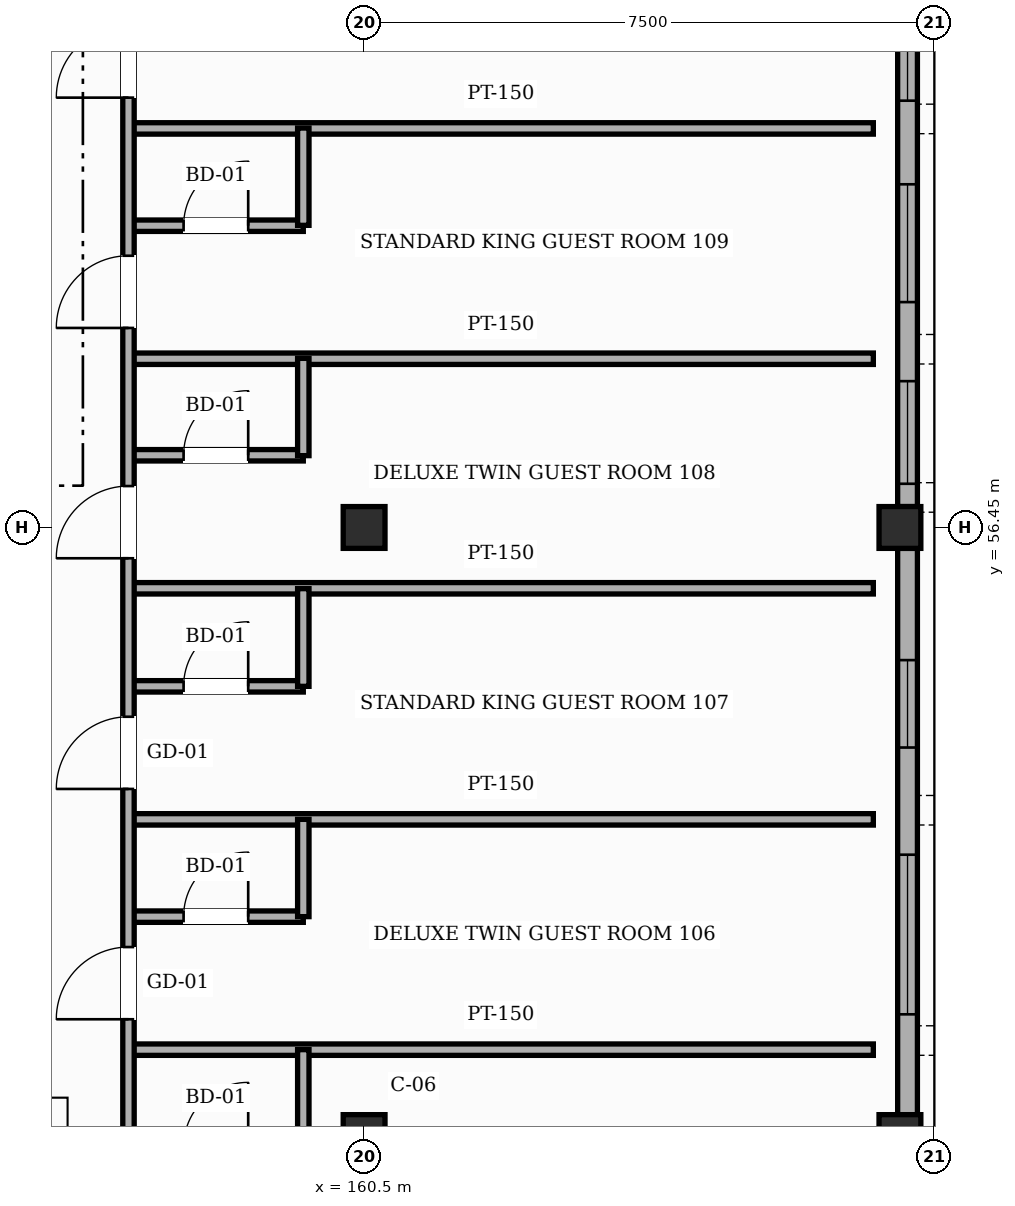
"""IFC4 building model, lengths in metres.
Left out: names, types, materials, properties, quantities, classifications, styles, units other than length and angle.
Written with IfcOpenShell. Run it as: python <this file> out.ifc"""

import sys

from ifc_helpers import new_model, si_unit, direction, frame, frame_2d, origin, origin_2d, place, context, subcontext, project, spatial, rectangle, hollow_rectangle, extrude, element, fill, save


model = new_model("IFC4")
c1 = context("Model", 3, precision=1e-05, world=origin(), true_north=direction((0.0, 1.0)))
c2 = subcontext(c1, "Body", "Model", "MODEL_VIEW")
j1 = project(units=[si_unit("LENGTHUNIT", "METRE"), si_unit("PLANEANGLEUNIT", "RADIAN")], contexts=[c1])
p1 = place(None, origin())
s1 = spatial("IfcSite", under=j1, at=p1, CompositionType="ELEMENT")
p2 = place(p1, origin())
s2 = spatial("IfcBuilding", under=s1, at=p2, CompositionType="ELEMENT")
p3 = place(p2, frame((0.0, 0.0, 24.6)))
s3 = spatial("IfcBuildingStorey", under=s2, at=p3, CompositionType="ELEMENT", Elevation=24.6)
for number, where, z_axis, x_axis in (
    (1, (160.5, 48.45, 0.0), (0.0, 0.0, 1.0), (1.0, 0.0, 0.0)),
    (2, (160.5, 56.45, 0.0), (0.0, 0.0, 1.0), (1.0, 0.0, 0.0)),
    (3, (167.55, 48.45, 0.0), (0.0, 0.0, 1.0), (1.0, 0.0, 0.0)),
    (4, (167.55, 56.45, 0.0), (0.0, 0.0, 1.0), (1.0, 0.0, 0.0)),
):
    element("IfcColumn", number, at=place(p3, frame(where, z_axis=z_axis, x_axis=x_axis)), inside=s3, PredefinedType="COLUMN", context=c2, shape_type="SweptSolid", body=[
        extrude(hollow_rectangle(XDim=0.55, YDim=0.55, WallThickness=0.022, InnerFilletRadius=0.022, OuterFilletRadius=0.044, at=origin_2d()), origin(), (0.0, 0.0, 1.0), 3.6),
    ])
p4 = place(p3, frame((167.65, 56.175, 0.0), z_axis=(0.0, 0.0, 1.0), x_axis=(0.0, -1.0, 0.0)))
e5 = element("IfcWall", 5, at=p4, inside=s3, PredefinedType="SOLIDWALL", context=c2, shape_type="SweptSolid", body=[
    extrude(rectangle(XDim=7.45, YDim=0.26, at=frame_2d((3.725, 0.0))), origin(), (0.0, 0.0, 1.0), 2.755),
])
p5 = place(p4, frame((4.03, 0.0, 0.85)))
e6 = element("IfcOpeningElement", 6, at=p5, cuts=e5, PredefinedType="OPENING", context=c2, shape_type="SweptSolid", body=[
    extrude(rectangle(XDim=2.1, YDim=1.35, at=frame_2d((1.05, 0.675))), frame((0.0, 0.14, 0.0), z_axis=(0.0, -1.0, 0.0), x_axis=(1.0, 0.0, 0.0)), (0.0, 0.0, 1.0), 0.28),
])
p6 = place(p4, frame((1.47, 0.0, 0.85)))
e7 = element("IfcOpeningElement", 7, at=p6, cuts=e5, PredefinedType="OPENING", context=c2, shape_type="SweptSolid", body=[
    extrude(rectangle(XDim=1.15, YDim=1.5, at=frame_2d((0.575, 0.75))), frame((0.0, 0.14, 0.0), z_axis=(0.0, -1.0, 0.0), x_axis=(1.0, 0.0, 0.0)), (0.0, 0.0, 1.0), 0.28),
])
p7 = place(p3, frame((167.65, 64.175, 0.0), z_axis=(0.0, 0.0, 1.0), x_axis=(0.0, -1.0, 0.0)))
e8 = element("IfcWall", 8, at=p7, inside=s3, PredefinedType="SOLIDWALL", context=c2, shape_type="SweptSolid", body=[
    extrude(rectangle(XDim=7.45, YDim=0.26, at=frame_2d((3.725, 0.0))), origin(), (0.0, 0.0, 1.0), 2.755),
])
p8 = place(p7, frame((5.8, 0.0, 0.85)))
e9 = element("IfcOpeningElement", 9, at=p8, cuts=e8, PredefinedType="OPENING", context=c2, shape_type="SweptSolid", body=[
    extrude(rectangle(XDim=1.35, YDim=1.5, at=frame_2d((0.675, 0.75))), frame((0.0, 0.14, 0.0), z_axis=(0.0, -1.0, 0.0), x_axis=(1.0, 0.0, 0.0)), (0.0, 0.0, 1.0), 0.28),
])
p9 = place(p7, frame((3.21, 0.0, 0.85)))
e10 = element("IfcOpeningElement", 10, at=p9, cuts=e8, PredefinedType="OPENING", context=c2, shape_type="SweptSolid", body=[
    extrude(rectangle(XDim=1.55, YDim=1.5, at=frame_2d((0.775, 0.75))), frame((0.0, 0.14, 0.0), z_axis=(0.0, -1.0, 0.0), x_axis=(1.0, 0.0, 0.0)), (0.0, 0.0, 1.0), 0.28),
])
p10 = place(p7, frame((0.36, 0.0, 0.85)))
e11 = element("IfcOpeningElement", 11, at=p10, cuts=e8, PredefinedType="OPENING", context=c2, shape_type="SweptSolid", body=[
    extrude(rectangle(XDim=1.75, YDim=1.5, at=frame_2d((0.875, 0.75))), frame((0.0, 0.14, 0.0), z_axis=(0.0, -1.0, 0.0), x_axis=(1.0, 0.0, 0.0)), (0.0, 0.0, 1.0), 0.28),
])
p11 = place(p3, frame((157.4, 49.58, 0.0), z_axis=(0.0, 0.0, 1.0), x_axis=(1.0, 0.0, 0.0)))
e12 = element("IfcWall", 12, at=p11, inside=s3, PredefinedType="PARTITIONING", context=c2, shape_type="SweptSolid", body=[
    extrude(rectangle(XDim=9.8, YDim=0.15, at=frame_2d((4.9, 0.0))), origin(), (0.0, 0.0, 1.0), 3.365),
])
p12 = place(p3, frame((157.4, 51.33, 0.0), z_axis=(0.0, 0.0, 1.0), x_axis=(1.0, 0.0, 0.0)))
e13 = element("IfcWall", 13, at=p12, inside=s3, PredefinedType="PARTITIONING", context=c2, shape_type="SweptSolid", body=[
    extrude(rectangle(XDim=2.3, YDim=0.15, at=frame_2d((1.15, 0.0))), origin(), (0.0, 0.0, 1.0), 3.365),
])
p13 = place(p12, frame((0.725, 0.0, 0.0)))
e14 = element("IfcOpeningElement", 14, at=p13, cuts=e13, PredefinedType="OPENING", context=c2, shape_type="SweptSolid", body=[
    extrude(rectangle(XDim=0.85, YDim=2.1, at=frame_2d((0.425, 1.05))), frame((0.0, 0.085, 0.0), z_axis=(0.0, -1.0, 0.0), x_axis=(1.0, 0.0, 0.0)), (0.0, 0.0, 1.0), 0.17),
])
p14 = place(p3, frame((157.4, 52.61, 0.0), z_axis=(0.0, 0.0, 1.0), x_axis=(1.0, 0.0, 0.0)))
e15 = element("IfcWall", 15, at=p14, inside=s3, PredefinedType="PARTITIONING", context=c2, shape_type="SweptSolid", body=[
    extrude(rectangle(XDim=9.8, YDim=0.15, at=frame_2d((4.9, 0.0))), origin(), (0.0, 0.0, 1.0), 3.055),
])
p15 = place(p3, frame((157.4, 54.36, 0.0), z_axis=(0.0, 0.0, 1.0), x_axis=(1.0, 0.0, 0.0)))
e16 = element("IfcWall", 16, at=p15, inside=s3, PredefinedType="PARTITIONING", context=c2, shape_type="SweptSolid", body=[
    extrude(rectangle(XDim=2.3, YDim=0.15, at=frame_2d((1.15, 0.0))), origin(), (0.0, 0.0, 1.0), 3.365),
])
p16 = place(p15, frame((0.725, 0.0, 0.0)))
e17 = element("IfcOpeningElement", 17, at=p16, cuts=e16, PredefinedType="OPENING", context=c2, shape_type="SweptSolid", body=[
    extrude(rectangle(XDim=0.85, YDim=2.1, at=frame_2d((0.425, 1.05))), frame((0.0, 0.085, 0.0), z_axis=(0.0, -1.0, 0.0), x_axis=(1.0, 0.0, 0.0)), (0.0, 0.0, 1.0), 0.17),
])
p17 = place(p3, frame((157.4, 55.65, 0.0), z_axis=(0.0, 0.0, 1.0), x_axis=(1.0, 0.0, 0.0)))
e18 = element("IfcWall", 18, at=p17, inside=s3, PredefinedType="PARTITIONING", context=c2, shape_type="SweptSolid", body=[
    extrude(rectangle(XDim=9.8, YDim=0.15, at=frame_2d((4.9, 0.0))), origin(), (0.0, 0.0, 1.0), 3.365),
])
p18 = place(p3, frame((157.4, 57.4, 0.0), z_axis=(0.0, 0.0, 1.0), x_axis=(1.0, 0.0, 0.0)))
e19 = element("IfcWall", 19, at=p18, inside=s3, PredefinedType="PARTITIONING", context=c2, shape_type="SweptSolid", body=[
    extrude(rectangle(XDim=2.3, YDim=0.15, at=frame_2d((1.15, 0.0))), origin(), (0.0, 0.0, 1.0), 3.365),
])
p19 = place(p18, frame((0.725, 0.0, 0.0)))
e20 = element("IfcOpeningElement", 20, at=p19, cuts=e19, PredefinedType="OPENING", context=c2, shape_type="SweptSolid", body=[
    extrude(rectangle(XDim=0.85, YDim=2.1, at=frame_2d((0.425, 1.05))), frame((0.0, 0.085, 0.0), z_axis=(0.0, -1.0, 0.0), x_axis=(1.0, 0.0, 0.0)), (0.0, 0.0, 1.0), 0.17),
])
p20 = place(p3, frame((157.4, 58.67, 0.0), z_axis=(0.0, 0.0, 1.0), x_axis=(1.0, 0.0, 0.0)))
e21 = element("IfcWall", 21, at=p20, inside=s3, PredefinedType="PARTITIONING", context=c2, shape_type="SweptSolid", body=[
    extrude(rectangle(XDim=9.8, YDim=0.15, at=frame_2d((4.9, 0.0))), origin(), (0.0, 0.0, 1.0), 3.365),
])
p21 = place(p3, frame((157.4, 60.42, 0.0), z_axis=(0.0, 0.0, 1.0), x_axis=(1.0, 0.0, 0.0)))
e22 = element("IfcWall", 22, at=p21, inside=s3, PredefinedType="PARTITIONING", context=c2, shape_type="SweptSolid", body=[
    extrude(rectangle(XDim=2.3, YDim=0.15, at=frame_2d((1.15, 0.0))), origin(), (0.0, 0.0, 1.0), 3.365),
])
p22 = place(p21, frame((0.725, 0.0, 0.0)))
e23 = element("IfcOpeningElement", 23, at=p22, cuts=e22, PredefinedType="OPENING", context=c2, shape_type="SweptSolid", body=[
    extrude(rectangle(XDim=0.85, YDim=2.1, at=frame_2d((0.425, 1.05))), frame((0.0, 0.085, 0.0), z_axis=(0.0, -1.0, 0.0), x_axis=(1.0, 0.0, 0.0)), (0.0, 0.0, 1.0), 0.17),
])
p23 = place(p3, frame((157.4, 61.7, 0.0), z_axis=(0.0, 0.0, 1.0), x_axis=(1.0, 0.0, 0.0)))
e24 = element("IfcWall", 24, at=p23, inside=s3, PredefinedType="PARTITIONING", context=c2, shape_type="SweptSolid", body=[
    extrude(rectangle(XDim=9.8, YDim=0.15, at=frame_2d((4.9, 0.0))), origin(), (0.0, 0.0, 1.0), 3.365),
])
p24 = place(p3, frame((157.4, 22.3, 0.0), z_axis=(0.0, 0.0, 1.0), x_axis=(0.0, 1.0, 0.0)))
e25 = element("IfcWall", 25, at=p24, inside=s3, PredefinedType="PARTITIONING", context=c2, shape_type="SweptSolid", body=[
    extrude(rectangle(XDim=48.5, YDim=0.15, at=frame_2d((24.25, 0.0))), origin(), (0.0, 0.0, 1.0), 3.365),
])
p25 = place(p24, frame((0.4, 0.0, 0.0)))
e26 = element("IfcOpeningElement", 26, at=p25, cuts=e25, PredefinedType="OPENING", context=c2, shape_type="SweptSolid", body=[
    extrude(rectangle(XDim=0.95, YDim=2.15, at=frame_2d((0.475, 1.075))), frame((0.0, 0.085, 0.0), z_axis=(0.0, -1.0, 0.0), x_axis=(1.0, 0.0, 0.0)), (0.0, 0.0, 1.0), 0.17),
])
p26 = place(p24, frame((3.43, 0.0, 0.0)))
e27 = element("IfcOpeningElement", 27, at=p26, cuts=e25, PredefinedType="OPENING", context=c2, shape_type="SweptSolid", body=[
    extrude(rectangle(XDim=0.95, YDim=2.15, at=frame_2d((0.475, 1.075))), frame((0.0, 0.085, 0.0), z_axis=(0.0, -1.0, 0.0), x_axis=(1.0, 0.0, 0.0)), (0.0, 0.0, 1.0), 0.17),
])
p27 = place(p24, frame((6.46, 0.0, 0.0)))
e28 = element("IfcOpeningElement", 28, at=p27, cuts=e25, PredefinedType="OPENING", context=c2, shape_type="SweptSolid", body=[
    extrude(rectangle(XDim=0.95, YDim=2.15, at=frame_2d((0.475, 1.075))), frame((0.0, 0.085, 0.0), z_axis=(0.0, -1.0, 0.0), x_axis=(1.0, 0.0, 0.0)), (0.0, 0.0, 1.0), 0.17),
])
p28 = place(p24, frame((9.495, 0.0, 0.0)))
e29 = element("IfcOpeningElement", 29, at=p28, cuts=e25, PredefinedType="OPENING", context=c2, shape_type="SweptSolid", body=[
    extrude(rectangle(XDim=0.95, YDim=2.15, at=frame_2d((0.475, 1.075))), frame((0.0, 0.085, 0.0), z_axis=(0.0, -1.0, 0.0), x_axis=(1.0, 0.0, 0.0)), (0.0, 0.0, 1.0), 0.17),
])
p29 = place(p24, frame((12.525, 0.0, 0.0)))
e30 = element("IfcOpeningElement", 30, at=p29, cuts=e25, PredefinedType="OPENING", context=c2, shape_type="SweptSolid", body=[
    extrude(rectangle(XDim=0.95, YDim=2.15, at=frame_2d((0.475, 1.075))), frame((0.0, 0.085, 0.0), z_axis=(0.0, -1.0, 0.0), x_axis=(1.0, 0.0, 0.0)), (0.0, 0.0, 1.0), 0.17),
])
p30 = place(p24, frame((15.555, 0.0, 0.0)))
e31 = element("IfcOpeningElement", 31, at=p30, cuts=e25, PredefinedType="OPENING", context=c2, shape_type="SweptSolid", body=[
    extrude(rectangle(XDim=0.95, YDim=2.15, at=frame_2d((0.475, 1.075))), frame((0.0, 0.085, 0.0), z_axis=(0.0, -1.0, 0.0), x_axis=(1.0, 0.0, 0.0)), (0.0, 0.0, 1.0), 0.17),
])
p31 = place(p24, frame((18.585, 0.0, 0.0)))
e32 = element("IfcOpeningElement", 32, at=p31, cuts=e25, PredefinedType="OPENING", context=c2, shape_type="SweptSolid", body=[
    extrude(rectangle(XDim=0.95, YDim=2.15, at=frame_2d((0.475, 1.075))), frame((0.0, 0.085, 0.0), z_axis=(0.0, -1.0, 0.0), x_axis=(1.0, 0.0, 0.0)), (0.0, 0.0, 1.0), 0.17),
])
p32 = place(p24, frame((21.62, 0.0, 0.0)))
e33 = element("IfcOpeningElement", 33, at=p32, cuts=e25, PredefinedType="OPENING", context=c2, shape_type="SweptSolid", body=[
    extrude(rectangle(XDim=0.95, YDim=2.15, at=frame_2d((0.475, 1.075))), frame((0.0, 0.085, 0.0), z_axis=(0.0, -1.0, 0.0), x_axis=(1.0, 0.0, 0.0)), (0.0, 0.0, 1.0), 0.17),
])
p33 = place(p24, frame((24.65, 0.0, 0.0)))
e34 = element("IfcOpeningElement", 34, at=p33, cuts=e25, PredefinedType="OPENING", context=c2, shape_type="SweptSolid", body=[
    extrude(rectangle(XDim=0.95, YDim=2.15, at=frame_2d((0.475, 1.075))), frame((0.0, 0.085, 0.0), z_axis=(0.0, -1.0, 0.0), x_axis=(1.0, 0.0, 0.0)), (0.0, 0.0, 1.0), 0.17),
])
p34 = place(p24, frame((27.68, 0.0, 0.0)))
e35 = element("IfcOpeningElement", 35, at=p34, cuts=e25, PredefinedType="OPENING", context=c2, shape_type="SweptSolid", body=[
    extrude(rectangle(XDim=0.95, YDim=2.15, at=frame_2d((0.475, 1.075))), frame((0.0, 0.085, 0.0), z_axis=(0.0, -1.0, 0.0), x_axis=(1.0, 0.0, 0.0)), (0.0, 0.0, 1.0), 0.17),
])
p35 = place(p24, frame((30.71, 0.0, 0.0)))
e36 = element("IfcOpeningElement", 36, at=p35, cuts=e25, PredefinedType="OPENING", context=c2, shape_type="SweptSolid", body=[
    extrude(rectangle(XDim=0.95, YDim=2.15, at=frame_2d((0.475, 1.075))), frame((0.0, 0.085, 0.0), z_axis=(0.0, -1.0, 0.0), x_axis=(1.0, 0.0, 0.0)), (0.0, 0.0, 1.0), 0.17),
])
p36 = place(p24, frame((33.745, 0.0, 0.0)))
e37 = element("IfcOpeningElement", 37, at=p36, cuts=e25, PredefinedType="OPENING", context=c2, shape_type="SweptSolid", body=[
    extrude(rectangle(XDim=0.95, YDim=2.15, at=frame_2d((0.475, 1.075))), frame((0.0, 0.085, 0.0), z_axis=(0.0, -1.0, 0.0), x_axis=(1.0, 0.0, 0.0)), (0.0, 0.0, 1.0), 0.17),
])
p37 = place(p24, frame((36.775, 0.0, 0.0)))
e38 = element("IfcOpeningElement", 38, at=p37, cuts=e25, PredefinedType="OPENING", context=c2, shape_type="SweptSolid", body=[
    extrude(rectangle(XDim=0.95, YDim=2.15, at=frame_2d((0.475, 1.075))), frame((0.0, 0.085, 0.0), z_axis=(0.0, -1.0, 0.0), x_axis=(1.0, 0.0, 0.0)), (0.0, 0.0, 1.0), 0.17),
])
p38 = place(p24, frame((39.805, 0.0, 0.0)))
e39 = element("IfcOpeningElement", 39, at=p38, cuts=e25, PredefinedType="OPENING", context=c2, shape_type="SweptSolid", body=[
    extrude(rectangle(XDim=0.95, YDim=2.15, at=frame_2d((0.475, 1.075))), frame((0.0, 0.085, 0.0), z_axis=(0.0, -1.0, 0.0), x_axis=(1.0, 0.0, 0.0)), (0.0, 0.0, 1.0), 0.17),
])
p39 = place(p24, frame((42.84, 0.0, 0.0)))
e40 = element("IfcOpeningElement", 40, at=p39, cuts=e25, PredefinedType="OPENING", context=c2, shape_type="SweptSolid", body=[
    extrude(rectangle(XDim=0.95, YDim=2.15, at=frame_2d((0.475, 1.075))), frame((0.0, 0.085, 0.0), z_axis=(0.0, -1.0, 0.0), x_axis=(1.0, 0.0, 0.0)), (0.0, 0.0, 1.0), 0.17),
])
p40 = place(p24, frame((45.87, 0.0, 0.0)))
e41 = element("IfcOpeningElement", 41, at=p40, cuts=e25, PredefinedType="OPENING", context=c2, shape_type="SweptSolid", body=[
    extrude(rectangle(XDim=0.95, YDim=2.15, at=frame_2d((0.475, 1.075))), frame((0.0, 0.085, 0.0), z_axis=(0.0, -1.0, 0.0), x_axis=(1.0, 0.0, 0.0)), (0.0, 0.0, 1.0), 0.17),
])
for number, where, z_axis, x_axis in (
    (42, (159.7, 48.3, 0.0), (0.0, 0.0, 1.0), (0.0, 1.0, 0.0)),
    (43, (159.7, 51.33, 0.0), (0.0, 0.0, 1.0), (0.0, 1.0, 0.0)),
):
    element("IfcWall", number, at=place(p3, frame(where, z_axis=z_axis, x_axis=x_axis)), inside=s3, PredefinedType="PARTITIONING", context=c2, shape_type="SweptSolid", body=[
        extrude(rectangle(XDim=1.28, YDim=0.15, at=frame_2d((0.64, 0.0))), origin(), (0.0, 0.0, 1.0), 3.365),
    ])
p41 = place(p3, frame((159.7, 54.36, 0.0), z_axis=(0.0, 0.0, 1.0), x_axis=(0.0, 1.0, 0.0)))
e44 = element("IfcWall", 44, at=p41, inside=s3, PredefinedType="PARTITIONING", context=c2, shape_type="SweptSolid", body=[
    extrude(rectangle(XDim=1.285, YDim=0.15, at=frame_2d((0.643, 0.0))), origin(), (0.0, 0.0, 1.0), 3.365),
])
for number, where, z_axis, x_axis in (
    (45, (159.7, 57.395, 0.0), (0.0, 0.0, 1.0), (0.0, 1.0, 0.0)),
    (46, (159.7, 60.425, 0.0), (0.0, 0.0, 1.0), (0.0, 1.0, 0.0)),
):
    element("IfcWall", number, at=place(p3, frame(where, z_axis=z_axis, x_axis=x_axis)), inside=s3, PredefinedType="PARTITIONING", context=c2, shape_type="SweptSolid", body=[
        extrude(rectangle(XDim=1.28, YDim=0.15, at=frame_2d((0.64, 0.0))), origin(), (0.0, 0.0, 1.0), 3.365),
    ])
p42 = place(p5, origin())
e47 = element("IfcWindow", 47, at=p42, inside=s3, PartitioningType="SINGLE_PANEL", PredefinedType="WINDOW", context=c2, shape_type="SweptSolid", body=[
    extrude(rectangle(XDim=2.1, YDim=1.35, at=frame_2d((1.05, 0.675))), frame((0.0, 0.03, 0.0), z_axis=(0.0, -1.0, 0.0), x_axis=(1.0, 0.0, 0.0)), (0.0, 0.0, 1.0), 0.06),
])
fill(e6, e47)
p43 = place(p6, origin())
e48 = element("IfcWindow", 48, at=p43, inside=s3, PartitioningType="SINGLE_PANEL", PredefinedType="WINDOW", context=c2, shape_type="SweptSolid", body=[
    extrude(rectangle(XDim=1.15, YDim=1.5, at=frame_2d((0.575, 0.75))), frame((0.0, 0.03, 0.0), z_axis=(0.0, -1.0, 0.0), x_axis=(1.0, 0.0, 0.0)), (0.0, 0.0, 1.0), 0.06),
])
fill(e7, e48)
p44 = place(p8, origin())
e49 = element("IfcWindow", 49, at=p44, inside=s3, PartitioningType="SINGLE_PANEL", PredefinedType="WINDOW", context=c2, shape_type="SweptSolid", body=[
    extrude(rectangle(XDim=1.35, YDim=1.5, at=frame_2d((0.675, 0.75))), frame((0.0, 0.03, 0.0), z_axis=(0.0, -1.0, 0.0), x_axis=(1.0, 0.0, 0.0)), (0.0, 0.0, 1.0), 0.06),
])
fill(e9, e49)
p45 = place(p9, origin())
e50 = element("IfcWindow", 50, at=p45, inside=s3, PartitioningType="SINGLE_PANEL", PredefinedType="WINDOW", context=c2, shape_type="SweptSolid", body=[
    extrude(rectangle(XDim=1.55, YDim=1.5, at=frame_2d((0.775, 0.75))), frame((0.0, 0.03, 0.0), z_axis=(0.0, -1.0, 0.0), x_axis=(1.0, 0.0, 0.0)), (0.0, 0.0, 1.0), 0.06),
])
fill(e10, e50)
p46 = place(p10, origin())
e51 = element("IfcWindow", 51, at=p46, inside=s3, PartitioningType="SINGLE_PANEL", PredefinedType="WINDOW", context=c2, shape_type="SweptSolid", body=[
    extrude(rectangle(XDim=1.75, YDim=1.5, at=frame_2d((0.875, 0.75))), frame((0.0, 0.03, 0.0), z_axis=(0.0, -1.0, 0.0), x_axis=(1.0, 0.0, 0.0)), (0.0, 0.0, 1.0), 0.06),
])
fill(e11, e51)
p47 = place(p34, origin())
e52 = element("IfcDoor", 52, at=p47, inside=s3, OperationType="SINGLE_SWING_LEFT", PredefinedType="DOOR", context=c2, shape_type="SweptSolid", body=[
    extrude(rectangle(XDim=0.95, YDim=2.15, at=frame_2d((0.475, 1.075))), frame((0.0, 0.025, 0.0), z_axis=(0.0, -1.0, 0.0), x_axis=(1.0, 0.0, 0.0)), (0.0, 0.0, 1.0), 0.05),
])
fill(e35, e52)
p48 = place(p13, origin())
e53 = element("IfcDoor", 53, at=p48, inside=s3, OperationType="SINGLE_SWING_RIGHT", PredefinedType="DOOR", context=c2, shape_type="SweptSolid", body=[
    extrude(rectangle(XDim=0.85, YDim=2.1, at=frame_2d((0.425, 1.05))), frame((0.0, 0.025, 0.0), z_axis=(0.0, -1.0, 0.0), x_axis=(1.0, 0.0, 0.0)), (0.0, 0.0, 1.0), 0.05),
])
fill(e14, e53)
p49 = place(p35, origin())
e54 = element("IfcDoor", 54, at=p49, inside=s3, OperationType="SINGLE_SWING_LEFT", PredefinedType="DOOR", context=c2, shape_type="SweptSolid", body=[
    extrude(rectangle(XDim=0.95, YDim=2.15, at=frame_2d((0.475, 1.075))), frame((0.0, 0.025, 0.0), z_axis=(0.0, -1.0, 0.0), x_axis=(1.0, 0.0, 0.0)), (0.0, 0.0, 1.0), 0.05),
])
fill(e36, e54)
p50 = place(p16, origin())
e55 = element("IfcDoor", 55, at=p50, inside=s3, OperationType="SINGLE_SWING_RIGHT", PredefinedType="DOOR", context=c2, shape_type="SweptSolid", body=[
    extrude(rectangle(XDim=0.85, YDim=2.1, at=frame_2d((0.425, 1.05))), frame((0.0, 0.025, 0.0), z_axis=(0.0, -1.0, 0.0), x_axis=(1.0, 0.0, 0.0)), (0.0, 0.0, 1.0), 0.05),
])
fill(e17, e55)
p51 = place(p36, origin())
e56 = element("IfcDoor", 56, at=p51, inside=s3, OperationType="SINGLE_SWING_LEFT", PredefinedType="DOOR", context=c2, shape_type="SweptSolid", body=[
    extrude(rectangle(XDim=0.95, YDim=2.15, at=frame_2d((0.475, 1.075))), frame((0.0, 0.025, 0.0), z_axis=(0.0, -1.0, 0.0), x_axis=(1.0, 0.0, 0.0)), (0.0, 0.0, 1.0), 0.05),
])
fill(e37, e56)
p52 = place(p19, origin())
e57 = element("IfcDoor", 57, at=p52, inside=s3, OperationType="SINGLE_SWING_RIGHT", PredefinedType="DOOR", context=c2, shape_type="SweptSolid", body=[
    extrude(rectangle(XDim=0.85, YDim=2.1, at=frame_2d((0.425, 1.05))), frame((0.0, 0.025, 0.0), z_axis=(0.0, -1.0, 0.0), x_axis=(1.0, 0.0, 0.0)), (0.0, 0.0, 1.0), 0.05),
])
fill(e20, e57)
p53 = place(p37, origin())
e58 = element("IfcDoor", 58, at=p53, inside=s3, OperationType="SINGLE_SWING_LEFT", PredefinedType="DOOR", context=c2, shape_type="SweptSolid", body=[
    extrude(rectangle(XDim=0.95, YDim=2.15, at=frame_2d((0.475, 1.075))), frame((0.0, 0.025, 0.0), z_axis=(0.0, -1.0, 0.0), x_axis=(1.0, 0.0, 0.0)), (0.0, 0.0, 1.0), 0.05),
])
fill(e38, e58)
p54 = place(p22, origin())
e59 = element("IfcDoor", 59, at=p54, inside=s3, OperationType="SINGLE_SWING_RIGHT", PredefinedType="DOOR", context=c2, shape_type="SweptSolid", body=[
    extrude(rectangle(XDim=0.85, YDim=2.1, at=frame_2d((0.425, 1.05))), frame((0.0, 0.025, 0.0), z_axis=(0.0, -1.0, 0.0), x_axis=(1.0, 0.0, 0.0)), (0.0, 0.0, 1.0), 0.05),
])
fill(e23, e59)
p55 = place(p38, origin())
e60 = element("IfcDoor", 60, at=p55, inside=s3, OperationType="SINGLE_SWING_LEFT", PredefinedType="DOOR", context=c2, shape_type="SweptSolid", body=[
    extrude(rectangle(XDim=0.95, YDim=2.15, at=frame_2d((0.475, 1.075))), frame((0.0, 0.025, 0.0), z_axis=(0.0, -1.0, 0.0), x_axis=(1.0, 0.0, 0.0)), (0.0, 0.0, 1.0), 0.05),
])
fill(e39, e60)
save(model, sys.argv[1])
